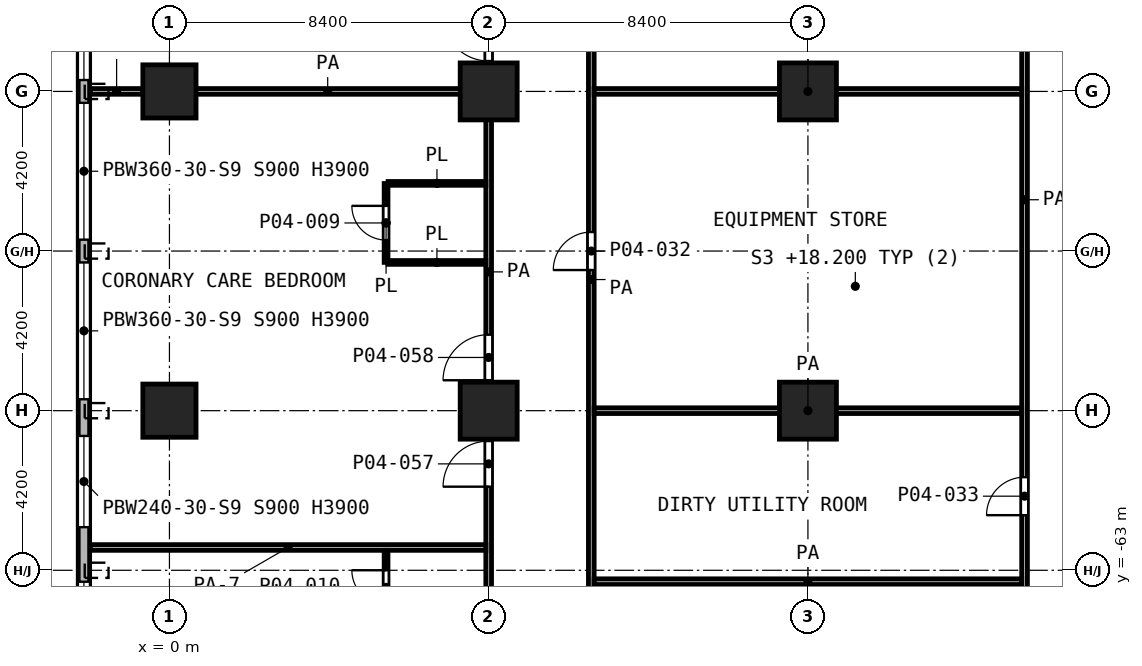
"""IFC4 building model, lengths in metres.
Left out: names, types, materials, properties, quantities, classifications, styles, units other than length and angle.
Written with IfcOpenShell. Run it as: python <this file> out.ifc"""

import sys

from ifc_helpers import new_model, si_unit, direction, frame, frame_2d, origin, origin_2d, place, context, subcontext, project, spatial, rectangle, extrude, element, fill, save


model = new_model("IFC4")
c1 = context("Model", 3, precision=1e-05, world=origin(), true_north=direction((0.0, 1.0)))
c2 = subcontext(c1, "Body", "Model", "MODEL_VIEW")
j1 = project(units=[si_unit("LENGTHUNIT", "METRE"), si_unit("PLANEANGLEUNIT", "RADIAN")], contexts=[c1])
p1 = place(None, origin())
s1 = spatial("IfcSite", under=j1, at=p1, CompositionType="ELEMENT")
p2 = place(p1, origin())
s2 = spatial("IfcBuilding", under=s1, at=p2, CompositionType="ELEMENT")
p3 = place(p2, frame((0.0, 0.0, 18.2)))
s3 = spatial("IfcBuildingStorey", under=s2, at=p3, CompositionType="ELEMENT", Elevation=18.2)
p4 = place(p3, frame((0.0, -50.4, 0.0), z_axis=(0.0, 0.0, 1.0), x_axis=(1.0, 0.0, 0.0)))
e1 = element("IfcColumn", 1, at=p4, inside=s3, PredefinedType="COLUMN", context=c2, shape_type="SweptSolid", body=[
    extrude(rectangle(XDim=1.4, YDim=1.4, at=origin_2d()), origin(), (0.0, 0.0, 1.0), 5.6),
])
for number, where, z_axis, x_axis in (
    (2, (8.4, -50.4, 0.0), (0.0, 0.0, 1.0), (1.0, 0.0, 0.0)),
    (3, (16.8, -50.4, 0.0), (0.0, 0.0, 1.0), (1.0, 0.0, 0.0)),
):
    element("IfcColumn", number, at=place(p3, frame(where, z_axis=z_axis, x_axis=x_axis)), inside=s3, PredefinedType="COLUMN", context=c2, shape_type="SweptSolid", body=[
        extrude(rectangle(XDim=1.5, YDim=1.5, at=origin_2d()), origin(), (0.0, 0.0, 1.0), 5.6),
    ])
p5 = place(p3, frame((0.0, -58.8, 0.0), z_axis=(0.0, 0.0, 1.0), x_axis=(1.0, 0.0, 0.0)))
e4 = element("IfcColumn", 4, at=p5, inside=s3, PredefinedType="COLUMN", context=c2, shape_type="SweptSolid", body=[
    extrude(rectangle(XDim=1.4, YDim=1.4, at=origin_2d()), origin(), (0.0, 0.0, 1.0), 5.6),
])
for number, where, z_axis, x_axis in (
    (5, (8.4, -58.8, 0.0), (0.0, 0.0, 1.0), (1.0, 0.0, 0.0)),
    (6, (16.8, -58.8, 0.0), (0.0, 0.0, 1.0), (1.0, 0.0, 0.0)),
):
    element("IfcColumn", number, at=place(p3, frame(where, z_axis=z_axis, x_axis=x_axis)), inside=s3, PredefinedType="COLUMN", context=c2, shape_type="SweptSolid", body=[
        extrude(rectangle(XDim=1.5, YDim=1.5, at=origin_2d()), origin(), (0.0, 0.0, 1.0), 5.6),
    ])
p6 = place(p3, frame((-2.25, -3.662, 0.0), z_axis=(0.0, 0.0, 1.0), x_axis=(0.0, -1.0, 0.0)))
e7 = element("IfcWall", 7, at=p6, inside=s3, PredefinedType="SOLIDWALL", context=c2, shape_type="SweptSolid", body=[
    extrude(rectangle(XDim=76.676, YDim=0.3, at=frame_2d((38.338, 0.0))), origin(), (0.0, 0.0, 1.0), 5.05),
])
p7 = place(p6, frame((0.838, 0.0, 0.9)))
e8 = element("IfcOpeningElement", 8, at=p7, cuts=e7, PredefinedType="OPENING", context=c2, shape_type="SweptSolid", body=[
    extrude(rectangle(XDim=3.6, YDim=3.0, at=frame_2d((1.8, 1.5))), frame((0.0, 0.16, 0.0), z_axis=(0.0, -1.0, 0.0), x_axis=(1.0, 0.0, 0.0)), (0.0, 0.0, 1.0), 0.32),
])
p8 = place(p6, frame((5.038, 0.0, 0.9)))
e9 = element("IfcOpeningElement", 9, at=p8, cuts=e7, PredefinedType="OPENING", context=c2, shape_type="SweptSolid", body=[
    extrude(rectangle(XDim=3.6, YDim=3.0, at=frame_2d((1.8, 1.5))), frame((0.0, 0.16, 0.0), z_axis=(0.0, -1.0, 0.0), x_axis=(1.0, 0.0, 0.0)), (0.0, 0.0, 1.0), 0.32),
])
p9 = place(p6, frame((9.238, 0.0, 0.9)))
e10 = element("IfcOpeningElement", 10, at=p9, cuts=e7, PredefinedType="OPENING", context=c2, shape_type="SweptSolid", body=[
    extrude(rectangle(XDim=3.6, YDim=3.0, at=frame_2d((1.8, 1.5))), frame((0.0, 0.16, 0.0), z_axis=(0.0, -1.0, 0.0), x_axis=(1.0, 0.0, 0.0)), (0.0, 0.0, 1.0), 0.32),
])
p10 = place(p6, frame((13.438, 0.0, 0.9)))
e11 = element("IfcOpeningElement", 11, at=p10, cuts=e7, PredefinedType="OPENING", context=c2, shape_type="SweptSolid", body=[
    extrude(rectangle(XDim=3.6, YDim=3.0, at=frame_2d((1.8, 1.5))), frame((0.0, 0.16, 0.0), z_axis=(0.0, -1.0, 0.0), x_axis=(1.0, 0.0, 0.0)), (0.0, 0.0, 1.0), 0.32),
])
p11 = place(p6, frame((17.638, 0.0, 0.9)))
e12 = element("IfcOpeningElement", 12, at=p11, cuts=e7, PredefinedType="OPENING", context=c2, shape_type="SweptSolid", body=[
    extrude(rectangle(XDim=3.6, YDim=3.0, at=frame_2d((1.8, 1.5))), frame((0.0, 0.16, 0.0), z_axis=(0.0, -1.0, 0.0), x_axis=(1.0, 0.0, 0.0)), (0.0, 0.0, 1.0), 0.32),
])
p12 = place(p6, frame((21.838, 0.0, 0.9)))
e13 = element("IfcOpeningElement", 13, at=p12, cuts=e7, PredefinedType="OPENING", context=c2, shape_type="SweptSolid", body=[
    extrude(rectangle(XDim=3.6, YDim=3.0, at=frame_2d((1.8, 1.5))), frame((0.0, 0.16, 0.0), z_axis=(0.0, -1.0, 0.0), x_axis=(1.0, 0.0, 0.0)), (0.0, 0.0, 1.0), 0.32),
])
p13 = place(p6, frame((26.038, 0.0, 0.9)))
e14 = element("IfcOpeningElement", 14, at=p13, cuts=e7, PredefinedType="OPENING", context=c2, shape_type="SweptSolid", body=[
    extrude(rectangle(XDim=3.6, YDim=3.0, at=frame_2d((1.8, 1.5))), frame((0.0, 0.16, 0.0), z_axis=(0.0, -1.0, 0.0), x_axis=(1.0, 0.0, 0.0)), (0.0, 0.0, 1.0), 0.32),
])
p14 = place(p6, frame((30.238, 0.0, 0.9)))
e15 = element("IfcOpeningElement", 15, at=p14, cuts=e7, PredefinedType="OPENING", context=c2, shape_type="SweptSolid", body=[
    extrude(rectangle(XDim=3.6, YDim=3.0, at=frame_2d((1.8, 1.5))), frame((0.0, 0.16, 0.0), z_axis=(0.0, -1.0, 0.0), x_axis=(1.0, 0.0, 0.0)), (0.0, 0.0, 1.0), 0.32),
])
p15 = place(p6, frame((34.438, 0.0, 0.9)))
e16 = element("IfcOpeningElement", 16, at=p15, cuts=e7, PredefinedType="OPENING", context=c2, shape_type="SweptSolid", body=[
    extrude(rectangle(XDim=3.6, YDim=3.0, at=frame_2d((1.8, 1.5))), frame((0.0, 0.16, 0.0), z_axis=(0.0, -1.0, 0.0), x_axis=(1.0, 0.0, 0.0)), (0.0, 0.0, 1.0), 0.32),
])
p16 = place(p6, frame((39.288, 0.0, 0.9)))
e17 = element("IfcOpeningElement", 17, at=p16, cuts=e7, PredefinedType="OPENING", context=c2, shape_type="SweptSolid", body=[
    extrude(rectangle(XDim=2.4, YDim=3.0, at=frame_2d((1.2, 1.5))), frame((0.0, 0.16, 0.0), z_axis=(0.0, -1.0, 0.0), x_axis=(1.0, 0.0, 0.0)), (0.0, 0.0, 1.0), 0.32),
])
p17 = place(p6, frame((42.838, 0.0, 0.9)))
e18 = element("IfcOpeningElement", 18, at=p17, cuts=e7, PredefinedType="OPENING", context=c2, shape_type="SweptSolid", body=[
    extrude(rectangle(XDim=3.6, YDim=3.0, at=frame_2d((1.8, 1.5))), frame((0.0, 0.16, 0.0), z_axis=(0.0, -1.0, 0.0), x_axis=(1.0, 0.0, 0.0)), (0.0, 0.0, 1.0), 0.32),
])
p18 = place(p6, frame((47.038, 0.0, 0.9)))
e19 = element("IfcOpeningElement", 19, at=p18, cuts=e7, PredefinedType="OPENING", context=c2, shape_type="SweptSolid", body=[
    extrude(rectangle(XDim=3.6, YDim=3.0, at=frame_2d((1.8, 1.5))), frame((0.0, 0.16, 0.0), z_axis=(0.0, -1.0, 0.0), x_axis=(1.0, 0.0, 0.0)), (0.0, 0.0, 1.0), 0.32),
])
p19 = place(p6, frame((51.238, 0.0, 0.9)))
e20 = element("IfcOpeningElement", 20, at=p19, cuts=e7, PredefinedType="OPENING", context=c2, shape_type="SweptSolid", body=[
    extrude(rectangle(XDim=3.6, YDim=3.0, at=frame_2d((1.8, 1.5))), frame((0.0, 0.16, 0.0), z_axis=(0.0, -1.0, 0.0), x_axis=(1.0, 0.0, 0.0)), (0.0, 0.0, 1.0), 0.32),
])
p20 = place(p6, frame((55.803, 0.0, 0.9)))
e21 = element("IfcOpeningElement", 21, at=p20, cuts=e7, PredefinedType="OPENING", context=c2, shape_type="SweptSolid", body=[
    extrude(rectangle(XDim=2.4, YDim=3.0, at=frame_2d((1.2, 1.5))), frame((0.0, 0.16, 0.0), z_axis=(0.0, -1.0, 0.0), x_axis=(1.0, 0.0, 0.0)), (0.0, 0.0, 1.0), 0.32),
])
p21 = place(p6, frame((59.638, 0.0, 0.9)))
e22 = element("IfcOpeningElement", 22, at=p21, cuts=e7, PredefinedType="OPENING", context=c2, shape_type="SweptSolid", body=[
    extrude(rectangle(XDim=3.6, YDim=3.0, at=frame_2d((1.8, 1.5))), frame((0.0, 0.16, 0.0), z_axis=(0.0, -1.0, 0.0), x_axis=(1.0, 0.0, 0.0)), (0.0, 0.0, 1.0), 0.32),
])
p22 = place(p6, frame((63.838, 0.0, 0.9)))
e23 = element("IfcOpeningElement", 23, at=p22, cuts=e7, PredefinedType="OPENING", context=c2, shape_type="SweptSolid", body=[
    extrude(rectangle(XDim=3.6, YDim=3.0, at=frame_2d((1.8, 1.5))), frame((0.0, 0.16, 0.0), z_axis=(0.0, -1.0, 0.0), x_axis=(1.0, 0.0, 0.0)), (0.0, 0.0, 1.0), 0.32),
])
p23 = place(p6, frame((68.438, 0.0, 0.9)))
e24 = element("IfcOpeningElement", 24, at=p23, cuts=e7, PredefinedType="OPENING", context=c2, shape_type="SweptSolid", body=[
    extrude(rectangle(XDim=1.2, YDim=3.0, at=frame_2d((0.6, 1.5))), frame((0.0, 0.16, 0.0), z_axis=(0.0, -1.0, 0.0), x_axis=(1.0, 0.0, 0.0)), (0.0, 0.0, 1.0), 0.32),
])
p24 = place(p6, frame((72.238, 0.0, 0.9)))
e25 = element("IfcOpeningElement", 25, at=p24, cuts=e7, PredefinedType="OPENING", context=c2, shape_type="SweptSolid", body=[
    extrude(rectangle(XDim=3.6, YDim=3.0, at=frame_2d((1.8, 1.5))), frame((0.0, 0.16, 0.0), z_axis=(0.0, -1.0, 0.0), x_axis=(1.0, 0.0, 0.0)), (0.0, 0.0, 1.0), 0.32),
])
p25 = place(p3, frame((5.751, -54.9, 0.0), z_axis=(0.0, 0.0, 1.0), x_axis=(1.0, 0.0, 0.0)))
e26 = element("IfcWall", 26, at=p25, inside=s3, PredefinedType="PARTITIONING", context=c2, shape_type="SweptSolid", body=[
    extrude(rectangle(XDim=2.574, YDim=0.1, at=frame_2d((1.287, 0.0))), origin(), (0.0, 0.0, 1.0), 5.05),
])
p26 = place(p3, frame((5.753, -52.82, 0.0), z_axis=(0.0, 0.0, 1.0), x_axis=(1.0, 0.0, 0.0)))
e27 = element("IfcWall", 27, at=p26, inside=s3, PredefinedType="PARTITIONING", context=c2, shape_type="SweptSolid", body=[
    extrude(rectangle(XDim=2.572, YDim=0.1, at=frame_2d((1.286, 0.0))), origin(), (0.0, 0.0, 1.0), 5.05),
])
p27 = place(p3, frame((5.7, -64.498, 0.0), z_axis=(0.0, 0.0, 1.0), x_axis=(0.0, 1.0, 0.0)))
e28 = element("IfcWall", 28, at=p27, inside=s3, PredefinedType="PARTITIONING", context=c2, shape_type="SweptSolid", body=[
    extrude(rectangle(XDim=2.023, YDim=0.1, at=frame_2d((1.011, 0.0))), origin(), (0.0, 0.0, 1.0), 5.05),
])
p28 = place(p27, frame((0.599, 0.0, 0.0)))
e29 = element("IfcOpeningElement", 29, at=p28, cuts=e28, PredefinedType="OPENING", context=c2, shape_type="SweptSolid", body=[
    extrude(rectangle(XDim=0.9, YDim=2.1, at=frame_2d((0.45, 1.05))), frame((0.0, 0.06, 0.0), z_axis=(0.0, -1.0, 0.0), x_axis=(1.0, 0.0, 0.0)), (0.0, 0.0, 1.0), 0.12),
])
p29 = place(p3, frame((5.7, -54.898, 0.0), z_axis=(0.0, 0.0, 1.0), x_axis=(0.0, 1.0, 0.0)))
e30 = element("IfcWall", 30, at=p29, inside=s3, PredefinedType="PARTITIONING", context=c2, shape_type="SweptSolid", body=[
    extrude(rectangle(XDim=2.075, YDim=0.1, at=frame_2d((1.038, 0.0))), origin(), (0.0, 0.0, 1.0), 5.05),
])
p30 = place(p29, frame((0.587, 0.0, 0.0)))
e31 = element("IfcOpeningElement", 31, at=p30, cuts=e30, PredefinedType="OPENING", context=c2, shape_type="SweptSolid", body=[
    extrude(rectangle(XDim=0.9, YDim=2.1, at=frame_2d((0.45, 1.05))), frame((0.0, 0.06, 0.0), z_axis=(0.0, -1.0, 0.0), x_axis=(1.0, 0.0, 0.0)), (0.0, 0.0, 1.0), 0.12),
])
p31 = place(p3, frame((11.175, -63.3, 0.0), z_axis=(0.0, 0.0, 1.0), x_axis=(1.0, 0.0, 0.0)))
e32 = element("IfcWall", 32, at=p31, inside=s3, PredefinedType="PARTITIONING", context=c2, shape_type="SweptSolid", body=[
    extrude(rectangle(XDim=11.25, YDim=0.15, at=frame_2d((5.625, 0.0))), origin(), (0.0, 0.0, 1.0), 5.05),
])
p32 = place(p3, frame((-2.08, -62.4, 0.0), z_axis=(0.0, 0.0, 1.0), x_axis=(1.0, 0.0, 0.0)))
e33 = element("IfcWall", 33, at=p32, inside=s3, PredefinedType="PARTITIONING", context=c2, shape_type="SweptSolid", body=[
    extrude(rectangle(XDim=10.405, YDim=0.15, at=frame_2d((5.203, 0.0))), origin(), (0.0, 0.0, 1.0), 3.65),
])
p33 = place(p3, frame((11.175, -58.8, 0.0), z_axis=(0.0, 0.0, 1.0), x_axis=(1.0, 0.0, 0.0)))
e34 = element("IfcWall", 34, at=p33, inside=s3, PredefinedType="PARTITIONING", context=c2, shape_type="SweptSolid", body=[
    extrude(rectangle(XDim=11.25, YDim=0.15, at=frame_2d((5.625, 0.0))), origin(), (0.0, 0.0, 1.0), 5.05),
])
p34 = place(p3, frame((-2.08, -50.4, 0.0), z_axis=(0.0, 0.0, 1.0), x_axis=(1.0, 0.0, 0.0)))
e35 = element("IfcWall", 35, at=p34, inside=s3, PredefinedType="PARTITIONING", context=c2, shape_type="SweptSolid", body=[
    extrude(rectangle(XDim=1.38, YDim=0.15, at=frame_2d((0.69, 0.0))), origin(), (0.0, 0.0, 1.0), 4.15),
])
p35 = place(p3, frame((0.003, -50.4, 0.0), z_axis=(0.0, 0.0, 1.0), x_axis=(1.0, 0.0, 0.0)))
e36 = element("IfcWall", 36, at=p35, inside=s3, PredefinedType="PARTITIONING", context=c2, shape_type="SweptSolid", body=[
    extrude(rectangle(XDim=8.322, YDim=0.15, at=frame_2d((4.161, 0.0))), origin(), (0.0, 0.0, 1.0), 5.05),
])
p36 = place(p3, frame((11.175, -50.4, 0.0), z_axis=(0.0, 0.0, 1.0), x_axis=(1.0, 0.0, 0.0)))
e37 = element("IfcWall", 37, at=p36, inside=s3, PredefinedType="PARTITIONING", context=c2, shape_type="SweptSolid", body=[
    extrude(rectangle(XDim=11.25, YDim=0.15, at=frame_2d((5.625, 0.0))), origin(), (0.0, 0.0, 1.0), 5.05),
])
p37 = place(p3, frame((8.4, -67.947, 0.0), z_axis=(0.0, 0.0, 1.0), x_axis=(0.0, 1.0, 0.0)))
e38 = element("IfcWall", 38, at=p37, inside=s3, PredefinedType="PARTITIONING", context=c2, shape_type="SweptSolid", body=[
    extrude(rectangle(XDim=25.597, YDim=0.15, at=frame_2d((12.798, 0.0))), origin(), (0.0, 0.0, 1.0), 5.05),
])
p38 = place(p37, frame((18.347, 0.0, 0.0)))
e39 = element("IfcOpeningElement", 39, at=p38, cuts=e38, PredefinedType="OPENING", context=c2, shape_type="SweptSolid", body=[
    extrude(rectangle(XDim=1.2, YDim=2.1, at=frame_2d((0.6, 1.05))), frame((0.0, 0.085, 0.0), z_axis=(0.0, -1.0, 0.0), x_axis=(1.0, 0.0, 0.0)), (0.0, 0.0, 1.0), 0.17),
])
p39 = place(p37, frame((7.147, 0.0, 0.0)))
e40 = element("IfcOpeningElement", 40, at=p39, cuts=e38, PredefinedType="OPENING", context=c2, shape_type="SweptSolid", body=[
    extrude(rectangle(XDim=1.2, YDim=2.1, at=frame_2d((0.6, 1.05))), frame((0.0, 0.085, 0.0), z_axis=(0.0, -1.0, 0.0), x_axis=(1.0, 0.0, 0.0)), (0.0, 0.0, 1.0), 0.17),
])
p40 = place(p37, frame((9.947, 0.0, 0.0)))
e41 = element("IfcOpeningElement", 41, at=p40, cuts=e38, PredefinedType="OPENING", context=c2, shape_type="SweptSolid", body=[
    extrude(rectangle(XDim=1.2, YDim=2.1, at=frame_2d((0.6, 1.05))), frame((0.0, 0.085, 0.0), z_axis=(0.0, -1.0, 0.0), x_axis=(1.0, 0.0, 0.0)), (0.0, 0.0, 1.0), 0.17),
])
p41 = place(p37, frame((1.549, 0.0, 0.0)))
e42 = element("IfcOpeningElement", 42, at=p41, cuts=e38, PredefinedType="OPENING", context=c2, shape_type="SweptSolid", body=[
    extrude(rectangle(XDim=1.2, YDim=2.1, at=frame_2d((0.6, 1.05))), frame((0.0, 0.085, 0.0), z_axis=(0.0, -1.0, 0.0), x_axis=(1.0, 0.0, 0.0)), (0.0, 0.0, 1.0), 0.17),
])
p42 = place(p3, frame((11.1, -81.3, 0.0), z_axis=(0.0, 0.0, 1.0), x_axis=(0.0, 1.0, 0.0)))
e43 = element("IfcWall", 43, at=p42, inside=s3, PredefinedType="PARTITIONING", context=c2, shape_type="SweptSolid", body=[
    extrude(rectangle(XDim=51.9, YDim=0.15, at=frame_2d((25.95, 0.0))), origin(), (0.0, 0.0, 1.0), 5.05),
])
p43 = place(p42, frame((34.6, 0.0, 0.0)))
e44 = element("IfcOpeningElement", 44, at=p43, cuts=e43, PredefinedType="OPENING", context=c2, shape_type="SweptSolid", body=[
    extrude(rectangle(XDim=1.0, YDim=2.1, at=frame_2d((0.5, 1.05))), frame((0.0, 0.085, 0.0), z_axis=(0.0, -1.0, 0.0), x_axis=(1.0, 0.0, 0.0)), (0.0, 0.0, 1.0), 0.17),
])
p44 = place(p42, frame((26.2, 0.0, 0.0)))
e45 = element("IfcOpeningElement", 45, at=p44, cuts=e43, PredefinedType="OPENING", context=c2, shape_type="SweptSolid", body=[
    extrude(rectangle(XDim=1.0, YDim=2.1, at=frame_2d((0.5, 1.05))), frame((0.0, 0.085, 0.0), z_axis=(0.0, -1.0, 0.0), x_axis=(1.0, 0.0, 0.0)), (0.0, 0.0, 1.0), 0.17),
])
p45 = place(p42, frame((13.75, 0.0, 0.0)))
e46 = element("IfcOpeningElement", 46, at=p45, cuts=e43, PredefinedType="OPENING", context=c2, shape_type="SweptSolid", body=[
    extrude(rectangle(XDim=1.0, YDim=2.1, at=frame_2d((0.5, 1.05))), frame((0.0, 0.085, 0.0), z_axis=(0.0, -1.0, 0.0), x_axis=(1.0, 0.0, 0.0)), (0.0, 0.0, 1.0), 0.17),
])
p46 = place(p3, frame((22.5, -81.3, 0.0), z_axis=(0.0, 0.0, 1.0), x_axis=(0.0, 1.0, 0.0)))
e47 = element("IfcWall", 47, at=p46, inside=s3, PredefinedType="PARTITIONING", context=c2, shape_type="SweptSolid", body=[
    extrude(rectangle(XDim=56.1, YDim=0.15, at=frame_2d((28.05, 0.0))), origin(), (0.0, 0.0, 1.0), 5.05),
])
p47 = place(p46, frame((51.4, 0.0, 0.0)))
e48 = element("IfcOpeningElement", 48, at=p47, cuts=e47, PredefinedType="OPENING", context=c2, shape_type="SweptSolid", body=[
    extrude(rectangle(XDim=1.0, YDim=2.1, at=frame_2d((0.5, 1.05))), frame((0.0, 0.085, 0.0), z_axis=(0.0, -1.0, 0.0), x_axis=(1.0, 0.0, 0.0)), (0.0, 0.0, 1.0), 0.17),
])
p48 = place(p46, frame((43.0, 0.0, 0.0)))
e49 = element("IfcOpeningElement", 49, at=p48, cuts=e47, PredefinedType="OPENING", context=c2, shape_type="SweptSolid", body=[
    extrude(rectangle(XDim=1.0, YDim=2.1, at=frame_2d((0.5, 1.05))), frame((0.0, 0.085, 0.0), z_axis=(0.0, -1.0, 0.0), x_axis=(1.0, 0.0, 0.0)), (0.0, 0.0, 1.0), 0.17),
])
p49 = place(p46, frame((19.75, 0.0, 0.0)))
e50 = element("IfcOpeningElement", 50, at=p49, cuts=e47, PredefinedType="OPENING", context=c2, shape_type="SweptSolid", body=[
    extrude(rectangle(XDim=1.0, YDim=2.1, at=frame_2d((0.5, 1.05))), frame((0.0, 0.085, 0.0), z_axis=(0.0, -1.0, 0.0), x_axis=(1.0, 0.0, 0.0)), (0.0, 0.0, 1.0), 0.17),
])
p50 = place(p46, frame((5.5, 0.0, 0.0)))
e51 = element("IfcOpeningElement", 51, at=p50, cuts=e47, PredefinedType="OPENING", context=c2, shape_type="SweptSolid", body=[
    extrude(rectangle(XDim=1.0, YDim=2.1, at=frame_2d((0.5, 1.05))), frame((0.0, 0.085, 0.0), z_axis=(0.0, -1.0, 0.0), x_axis=(1.0, 0.0, 0.0)), (0.0, 0.0, 1.0), 0.17),
])
p51 = place(p17, origin())
e52 = element("IfcWindow", 52, at=p51, inside=s3, PartitioningType="SINGLE_PANEL", PredefinedType="WINDOW", context=c2, shape_type="SweptSolid", body=[
    extrude(rectangle(XDim=3.6, YDim=3.0, at=frame_2d((1.8, 1.5))), frame((0.0, 0.03, 0.0), z_axis=(0.0, -1.0, 0.0), x_axis=(1.0, 0.0, 0.0)), (0.0, 0.0, 1.0), 0.06),
])
fill(e18, e52)
p52 = place(p18, origin())
e53 = element("IfcWindow", 53, at=p52, inside=s3, PartitioningType="SINGLE_PANEL", PredefinedType="WINDOW", context=c2, shape_type="SweptSolid", body=[
    extrude(rectangle(XDim=3.6, YDim=3.0, at=frame_2d((1.8, 1.5))), frame((0.0, 0.03, 0.0), z_axis=(0.0, -1.0, 0.0), x_axis=(1.0, 0.0, 0.0)), (0.0, 0.0, 1.0), 0.06),
])
fill(e19, e53)
p53 = place(p19, origin())
e54 = element("IfcWindow", 54, at=p53, inside=s3, PartitioningType="SINGLE_PANEL", PredefinedType="WINDOW", context=c2, shape_type="SweptSolid", body=[
    extrude(rectangle(XDim=3.6, YDim=3.0, at=frame_2d((1.8, 1.5))), frame((0.0, 0.03, 0.0), z_axis=(0.0, -1.0, 0.0), x_axis=(1.0, 0.0, 0.0)), (0.0, 0.0, 1.0), 0.06),
])
fill(e20, e54)
p54 = place(p20, origin())
e55 = element("IfcWindow", 55, at=p54, inside=s3, PartitioningType="SINGLE_PANEL", PredefinedType="WINDOW", context=c2, shape_type="SweptSolid", body=[
    extrude(rectangle(XDim=2.4, YDim=3.0, at=frame_2d((1.2, 1.5))), frame((0.0, 0.03, 0.0), z_axis=(0.0, -1.0, 0.0), x_axis=(1.0, 0.0, 0.0)), (0.0, 0.0, 1.0), 0.06),
])
fill(e21, e55)
p55 = place(p21, origin())
e56 = element("IfcWindow", 56, at=p55, inside=s3, PartitioningType="SINGLE_PANEL", PredefinedType="WINDOW", context=c2, shape_type="SweptSolid", body=[
    extrude(rectangle(XDim=3.6, YDim=3.0, at=frame_2d((1.8, 1.5))), frame((0.0, 0.03, 0.0), z_axis=(0.0, -1.0, 0.0), x_axis=(1.0, 0.0, 0.0)), (0.0, 0.0, 1.0), 0.06),
])
fill(e22, e56)
p56 = place(p38, origin())
e57 = element("IfcDoor", 57, at=p56, inside=s3, OperationType="SINGLE_SWING_RIGHT", PredefinedType="DOOR", context=c2, shape_type="SweptSolid", body=[
    extrude(rectangle(XDim=1.2, YDim=2.1, at=frame_2d((0.6, 1.05))), frame((0.0, 0.025, 0.0), z_axis=(0.0, -1.0, 0.0), x_axis=(1.0, 0.0, 0.0)), (0.0, 0.0, 1.0), 0.05),
])
fill(e39, e57)
p57 = place(p39, origin())
e58 = element("IfcDoor", 58, at=p57, inside=s3, OperationType="SINGLE_SWING_LEFT", PredefinedType="DOOR", context=c2, shape_type="SweptSolid", body=[
    extrude(rectangle(XDim=1.2, YDim=2.1, at=frame_2d((0.6, 1.05))), frame((0.0, 0.025, 0.0), z_axis=(0.0, -1.0, 0.0), x_axis=(1.0, 0.0, 0.0)), (0.0, 0.0, 1.0), 0.05),
])
fill(e40, e58)
p58 = place(p40, origin())
e59 = element("IfcDoor", 59, at=p58, inside=s3, OperationType="SINGLE_SWING_LEFT", PredefinedType="DOOR", context=c2, shape_type="SweptSolid", body=[
    extrude(rectangle(XDim=1.2, YDim=2.1, at=frame_2d((0.6, 1.05))), frame((0.0, 0.025, 0.0), z_axis=(0.0, -1.0, 0.0), x_axis=(1.0, 0.0, 0.0)), (0.0, 0.0, 1.0), 0.05),
])
fill(e41, e59)
p59 = place(p30, origin())
e60 = element("IfcDoor", 60, at=p59, inside=s3, OperationType="SINGLE_SWING_RIGHT", PredefinedType="DOOR", context=c2, shape_type="SweptSolid", body=[
    extrude(rectangle(XDim=0.9, YDim=2.1, at=frame_2d((0.45, 1.05))), frame((0.0, 0.025, 0.0), z_axis=(0.0, -1.0, 0.0), x_axis=(1.0, 0.0, 0.0)), (0.0, 0.0, 1.0), 0.05),
])
fill(e31, e60)
p60 = place(p28, origin())
e61 = element("IfcDoor", 61, at=p60, inside=s3, OperationType="SINGLE_SWING_RIGHT", PredefinedType="DOOR", context=c2, shape_type="SweptSolid", body=[
    extrude(rectangle(XDim=0.9, YDim=2.1, at=frame_2d((0.45, 1.05))), frame((0.0, 0.025, 0.0), z_axis=(0.0, -1.0, 0.0), x_axis=(1.0, 0.0, 0.0)), (0.0, 0.0, 1.0), 0.05),
])
fill(e29, e61)
p61 = place(p44, origin())
e62 = element("IfcDoor", 62, at=p61, inside=s3, OperationType="SINGLE_SWING_LEFT", PredefinedType="DOOR", context=c2, shape_type="SweptSolid", body=[
    extrude(rectangle(XDim=1.0, YDim=2.1, at=frame_2d((0.5, 1.05))), frame((0.0, 0.025, 0.0), z_axis=(0.0, -1.0, 0.0), x_axis=(1.0, 0.0, 0.0)), (0.0, 0.0, 1.0), 0.05),
])
fill(e45, e62)
p62 = place(p49, origin())
e63 = element("IfcDoor", 63, at=p62, inside=s3, OperationType="SINGLE_SWING_LEFT", PredefinedType="DOOR", context=c2, shape_type="SweptSolid", body=[
    extrude(rectangle(XDim=1.0, YDim=2.1, at=frame_2d((0.5, 1.05))), frame((0.0, 0.025, 0.0), z_axis=(0.0, -1.0, 0.0), x_axis=(1.0, 0.0, 0.0)), (0.0, 0.0, 1.0), 0.05),
])
fill(e50, e63)
save(model, sys.argv[1])
